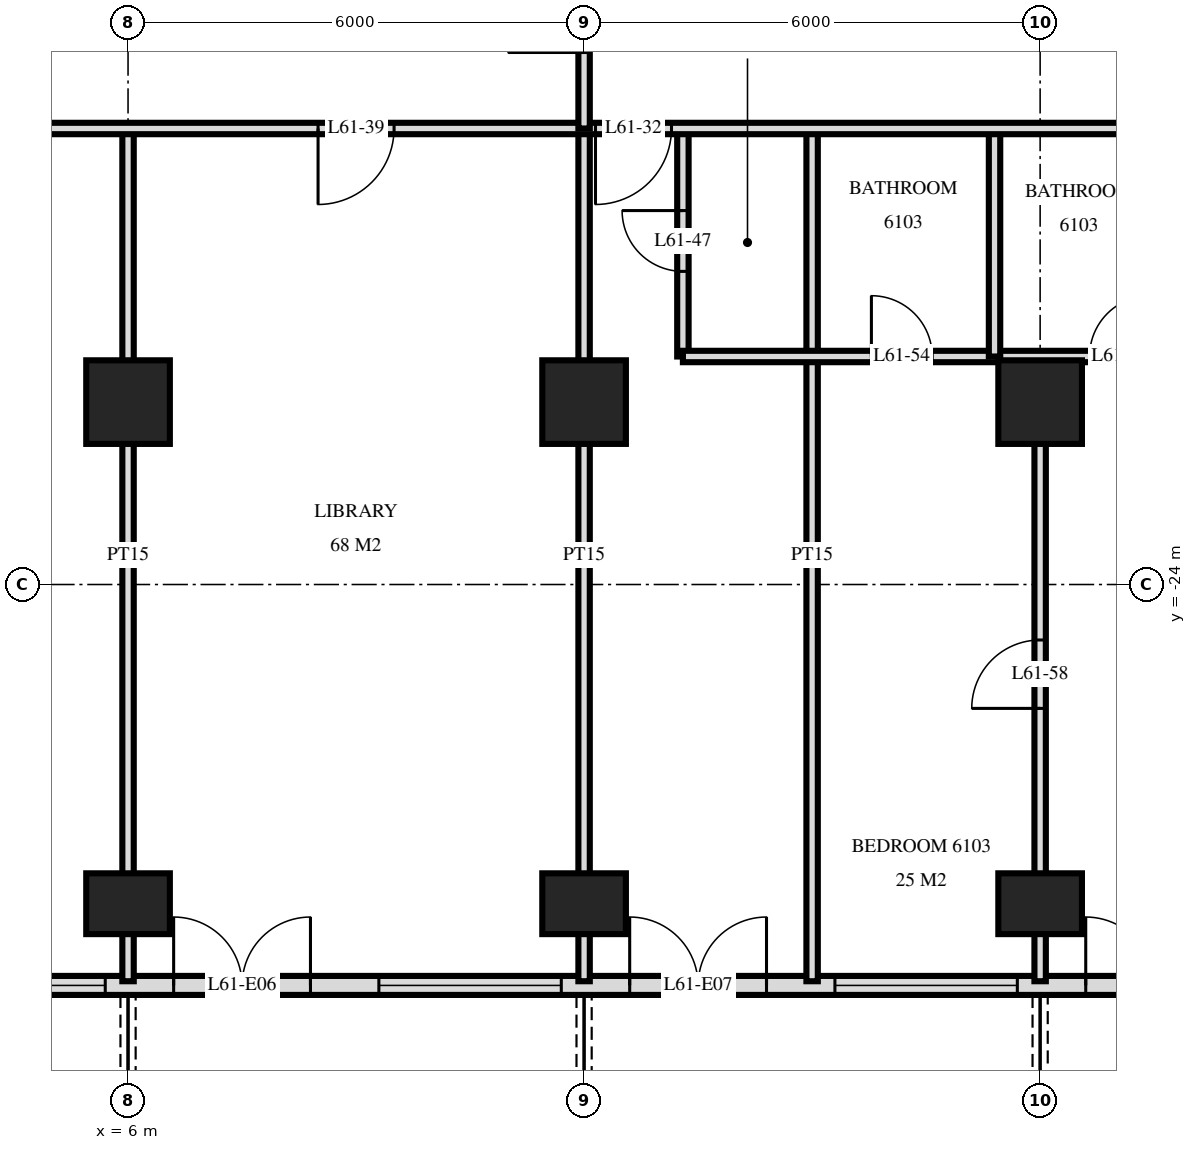
"""IFC4 building model, lengths in metres.
Left out: names, types, materials, properties, quantities, classifications, styles, units other than length and angle.
Written with IfcOpenShell. Run it as: python <this file> out.ifc"""

import sys

from ifc_helpers import new_model, si_unit, direction, frame, frame_2d, origin, origin_2d, place, context, subcontext, project, spatial, rectangle, extrude, element, fill, save


model = new_model("IFC4")
c1 = context("Model", 3, precision=1e-05, world=origin(), true_north=direction((0.0, 1.0)))
c2 = subcontext(c1, "Body", "Model", "MODEL_VIEW")
j1 = project(units=[si_unit("LENGTHUNIT", "METRE"), si_unit("PLANEANGLEUNIT", "RADIAN")], contexts=[c1])
p1 = place(None, origin())
s1 = spatial("IfcSite", under=j1, at=p1, CompositionType="ELEMENT")
p2 = place(p1, origin())
s2 = spatial("IfcBuilding", under=s1, at=p2, CompositionType="ELEMENT")
p3 = place(p2, frame((0.0, 0.0, 232.6)))
s3 = spatial("IfcBuildingStorey", under=s2, at=p3, CompositionType="ELEMENT", Elevation=232.6)
p4 = place(p3, frame((6.0, -28.2, 0.0), z_axis=(0.0, 0.0, 1.0), x_axis=(1.0, 0.0, 0.0)))
e1 = element("IfcColumn", 1, at=p4, inside=s3, PredefinedType="COLUMN", context=c2, shape_type="SweptSolid", body=[
    extrude(rectangle(XDim=1.1, YDim=0.8, at=origin_2d()), origin(), (0.0, 0.0, 1.0), 3.5),
])
p5 = place(p3, frame((6.0, -21.6, 0.0), z_axis=(0.0, 0.0, 1.0), x_axis=(1.0, 0.0, 0.0)))
e2 = element("IfcColumn", 2, at=p5, inside=s3, PredefinedType="COLUMN", context=c2, shape_type="SweptSolid", body=[
    extrude(rectangle(XDim=1.1, YDim=1.1, at=origin_2d()), origin(), (0.0, 0.0, 1.0), 3.5),
])
p6 = place(p3, frame((12.0, -28.2, 0.0), z_axis=(0.0, 0.0, 1.0), x_axis=(1.0, 0.0, 0.0)))
e3 = element("IfcColumn", 3, at=p6, inside=s3, PredefinedType="COLUMN", context=c2, shape_type="SweptSolid", body=[
    extrude(rectangle(XDim=1.1, YDim=0.8, at=origin_2d()), origin(), (0.0, 0.0, 1.0), 3.5),
])
p7 = place(p3, frame((12.0, -21.6, 0.0), z_axis=(0.0, 0.0, 1.0), x_axis=(1.0, 0.0, 0.0)))
e4 = element("IfcColumn", 4, at=p7, inside=s3, PredefinedType="COLUMN", context=c2, shape_type="SweptSolid", body=[
    extrude(rectangle(XDim=1.1, YDim=1.1, at=origin_2d()), origin(), (0.0, 0.0, 1.0), 3.5),
])
p8 = place(p3, frame((18.0, -28.2, 0.0), z_axis=(0.0, 0.0, 1.0), x_axis=(1.0, 0.0, 0.0)))
e5 = element("IfcColumn", 5, at=p8, inside=s3, PredefinedType="COLUMN", context=c2, shape_type="SweptSolid", body=[
    extrude(rectangle(XDim=1.1, YDim=0.8, at=origin_2d()), origin(), (0.0, 0.0, 1.0), 3.5),
])
p9 = place(p3, frame((18.0, -21.6, 0.0), z_axis=(0.0, 0.0, 1.0), x_axis=(1.0, 0.0, 0.0)))
e6 = element("IfcColumn", 6, at=p9, inside=s3, PredefinedType="COLUMN", context=c2, shape_type="SweptSolid", body=[
    extrude(rectangle(XDim=1.1, YDim=1.1, at=origin_2d()), origin(), (0.0, 0.0, 1.0), 3.5),
])
p10 = place(p3, frame((-22.475, -29.275, 0.0), z_axis=(0.0, 0.0, 1.0), x_axis=(1.0, 0.0, 0.0)))
e7 = element("IfcWall", 7, at=p10, inside=s3, PredefinedType="SOLIDWALL", context=c2, shape_type="SweptSolid", body=[
    extrude(rectangle(XDim=44.951, YDim=0.25, at=frame_2d((22.475, 0.0))), origin(), (0.0, 0.0, 1.0), 3.22),
])
p11 = place(p10, frame((0.575, 0.0, 0.0)))
e8 = element("IfcOpeningElement", 8, at=p11, cuts=e7, PredefinedType="OPENING", context=c2, shape_type="SweptSolid", body=[
    extrude(rectangle(XDim=1.8, YDim=2.4, at=frame_2d((0.9, 1.2))), frame((0.0, 0.135, 0.0), z_axis=(0.0, -1.0, 0.0), x_axis=(1.0, 0.0, 0.0)), (0.0, 0.0, 1.0), 0.27),
])
p12 = place(p10, frame((8.075, 0.0, 0.0)))
e9 = element("IfcOpeningElement", 9, at=p12, cuts=e7, PredefinedType="OPENING", context=c2, shape_type="SweptSolid", body=[
    extrude(rectangle(XDim=1.8, YDim=2.4, at=frame_2d((0.9, 1.2))), frame((0.0, 0.135, 0.0), z_axis=(0.0, -1.0, 0.0), x_axis=(1.0, 0.0, 0.0)), (0.0, 0.0, 1.0), 0.27),
])
p13 = place(p10, frame((11.075, 0.0, 0.0)))
e10 = element("IfcOpeningElement", 10, at=p13, cuts=e7, PredefinedType="OPENING", context=c2, shape_type="SweptSolid", body=[
    extrude(rectangle(XDim=1.8, YDim=2.4, at=frame_2d((0.9, 1.2))), frame((0.0, 0.135, 0.0), z_axis=(0.0, -1.0, 0.0), x_axis=(1.0, 0.0, 0.0)), (0.0, 0.0, 1.0), 0.27),
])
p14 = place(p10, frame((13.775, 0.0, 0.9)))
e11 = element("IfcOpeningElement", 11, at=p14, cuts=e7, PredefinedType="OPENING", context=c2, shape_type="SweptSolid", body=[
    extrude(rectangle(XDim=2.4, YDim=1.5, at=frame_2d((1.2, 0.75))), frame((0.0, 0.135, 0.0), z_axis=(0.0, -1.0, 0.0), x_axis=(1.0, 0.0, 0.0)), (0.0, 0.0, 1.0), 0.27),
])
p15 = place(p10, frame((16.775, 0.0, 0.9)))
e12 = element("IfcOpeningElement", 12, at=p15, cuts=e7, PredefinedType="OPENING", context=c2, shape_type="SweptSolid", body=[
    extrude(rectangle(XDim=2.4, YDim=1.5, at=frame_2d((1.2, 0.75))), frame((0.0, 0.135, 0.0), z_axis=(0.0, -1.0, 0.0), x_axis=(1.0, 0.0, 0.0)), (0.0, 0.0, 1.0), 0.27),
])
p16 = place(p10, frame((20.075, 0.0, 0.0)))
e13 = element("IfcOpeningElement", 13, at=p16, cuts=e7, PredefinedType="OPENING", context=c2, shape_type="SweptSolid", body=[
    extrude(rectangle(XDim=1.8, YDim=2.4, at=frame_2d((0.9, 1.2))), frame((0.0, 0.135, 0.0), z_axis=(0.0, -1.0, 0.0), x_axis=(1.0, 0.0, 0.0)), (0.0, 0.0, 1.0), 0.27),
])
p17 = place(p10, frame((23.075, 0.0, 0.0)))
e14 = element("IfcOpeningElement", 14, at=p17, cuts=e7, PredefinedType="OPENING", context=c2, shape_type="SweptSolid", body=[
    extrude(rectangle(XDim=1.8, YDim=2.4, at=frame_2d((0.9, 1.2))), frame((0.0, 0.135, 0.0), z_axis=(0.0, -1.0, 0.0), x_axis=(1.0, 0.0, 0.0)), (0.0, 0.0, 1.0), 0.27),
])
p18 = place(p10, frame((25.775, 0.0, 0.9)))
e15 = element("IfcOpeningElement", 15, at=p18, cuts=e7, PredefinedType="OPENING", context=c2, shape_type="SweptSolid", body=[
    extrude(rectangle(XDim=2.4, YDim=1.5, at=frame_2d((1.2, 0.75))), frame((0.0, 0.135, 0.0), z_axis=(0.0, -1.0, 0.0), x_axis=(1.0, 0.0, 0.0)), (0.0, 0.0, 1.0), 0.27),
])
p19 = place(p10, frame((29.075, 0.0, 0.0)))
e16 = element("IfcOpeningElement", 16, at=p19, cuts=e7, PredefinedType="OPENING", context=c2, shape_type="SweptSolid", body=[
    extrude(rectangle(XDim=1.8, YDim=2.4, at=frame_2d((0.9, 1.2))), frame((0.0, 0.135, 0.0), z_axis=(0.0, -1.0, 0.0), x_axis=(1.0, 0.0, 0.0)), (0.0, 0.0, 1.0), 0.27),
])
p20 = place(p10, frame((31.775, 0.0, 0.9)))
e17 = element("IfcOpeningElement", 17, at=p20, cuts=e7, PredefinedType="OPENING", context=c2, shape_type="SweptSolid", body=[
    extrude(rectangle(XDim=2.4, YDim=1.5, at=frame_2d((1.2, 0.75))), frame((0.0, 0.135, 0.0), z_axis=(0.0, -1.0, 0.0), x_axis=(1.0, 0.0, 0.0)), (0.0, 0.0, 1.0), 0.27),
])
p21 = place(p10, frame((35.075, 0.0, 0.0)))
e18 = element("IfcOpeningElement", 18, at=p21, cuts=e7, PredefinedType="OPENING", context=c2, shape_type="SweptSolid", body=[
    extrude(rectangle(XDim=1.8, YDim=2.4, at=frame_2d((0.9, 1.2))), frame((0.0, 0.135, 0.0), z_axis=(0.0, -1.0, 0.0), x_axis=(1.0, 0.0, 0.0)), (0.0, 0.0, 1.0), 0.27),
])
p22 = place(p10, frame((37.775, 0.0, 0.9)))
e19 = element("IfcOpeningElement", 19, at=p22, cuts=e7, PredefinedType="OPENING", context=c2, shape_type="SweptSolid", body=[
    extrude(rectangle(XDim=2.4, YDim=1.5, at=frame_2d((1.2, 0.75))), frame((0.0, 0.135, 0.0), z_axis=(0.0, -1.0, 0.0), x_axis=(1.0, 0.0, 0.0)), (0.0, 0.0, 1.0), 0.27),
])
p23 = place(p10, frame((41.075, 0.0, 0.0)))
e20 = element("IfcOpeningElement", 20, at=p23, cuts=e7, PredefinedType="OPENING", context=c2, shape_type="SweptSolid", body=[
    extrude(rectangle(XDim=1.8, YDim=2.4, at=frame_2d((0.9, 1.2))), frame((0.0, 0.135, 0.0), z_axis=(0.0, -1.0, 0.0), x_axis=(1.0, 0.0, 0.0)), (0.0, 0.0, 1.0), 0.27),
])
p24 = place(p3, frame((18.0, -29.22, 0.0), z_axis=(0.0, 0.0, 1.0), x_axis=(0.0, 1.0, 0.0)))
e21 = element("IfcWall", 21, at=p24, inside=s3, PredefinedType="PARTITIONING", context=c2, shape_type="SweptSolid", body=[
    extrude(rectangle(XDim=8.22, YDim=0.15, at=frame_2d((4.11, 0.0))), origin(), (0.0, 0.0, 1.0), 3.22),
])
p25 = place(p24, frame((3.59, 0.0, 0.0)))
e22 = element("IfcOpeningElement", 22, at=p25, cuts=e21, PredefinedType="OPENING", context=c2, shape_type="SweptSolid", body=[
    extrude(rectangle(XDim=0.9, YDim=2.1, at=frame_2d((0.45, 1.05))), frame((0.0, 0.085, 0.0), z_axis=(0.0, -1.0, 0.0), x_axis=(1.0, 0.0, 0.0)), (0.0, 0.0, 1.0), 0.17),
])
p26 = place(p3, frame((17.4, -21.0, 0.0), z_axis=(0.0, 0.0, 1.0), x_axis=(0.0, 1.0, 0.0)))
e23 = element("IfcWall", 23, at=p26, inside=s3, PredefinedType="PARTITIONING", context=c2, shape_type="SweptSolid", body=[
    extrude(rectangle(XDim=3.0, YDim=0.15, at=frame_2d((1.5, 0.0))), origin(), (0.0, 0.0, 1.0), 3.22),
])
p27 = place(p3, frame((15.0, -29.22, 0.0), z_axis=(0.0, 0.0, 1.0), x_axis=(0.0, 1.0, 0.0)))
e24 = element("IfcWall", 24, at=p27, inside=s3, PredefinedType="PARTITIONING", context=c2, shape_type="SweptSolid", body=[
    extrude(rectangle(XDim=11.22, YDim=0.15, at=frame_2d((5.61, 0.0))), origin(), (0.0, 0.0, 1.0), 3.22),
])
p28 = place(p3, frame((13.3, -21.0, 0.0), z_axis=(0.0, 0.0, 1.0), x_axis=(0.0, 1.0, 0.0)))
e25 = element("IfcWall", 25, at=p28, inside=s3, PredefinedType="PARTITIONING", context=c2, shape_type="SweptSolid", body=[
    extrude(rectangle(XDim=3.0, YDim=0.15, at=frame_2d((1.5, 0.0))), origin(), (0.0, 0.0, 1.0), 3.22),
])
p29 = place(p28, frame((1.12, 0.0, 0.0)))
e26 = element("IfcOpeningElement", 26, at=p29, cuts=e25, PredefinedType="OPENING", context=c2, shape_type="SweptSolid", body=[
    extrude(rectangle(XDim=0.8, YDim=2.1, at=frame_2d((0.4, 1.05))), frame((0.0, 0.085, 0.0), z_axis=(0.0, -1.0, 0.0), x_axis=(1.0, 0.0, 0.0)), (0.0, 0.0, 1.0), 0.17),
])
p30 = place(p3, frame((12.0, -18.0, 0.0), z_axis=(0.0, 0.0, 1.0), x_axis=(0.0, 1.0, 0.0)))
e27 = element("IfcWall", 27, at=p30, inside=s3, PredefinedType="PARTITIONING", context=c2, shape_type="SweptSolid", body=[
    extrude(rectangle(XDim=2.95, YDim=0.15, at=frame_2d((1.475, 0.0))), origin(), (0.0, 0.0, 1.0), 3.22),
])
p31 = place(p30, frame((1.0, 0.0, 0.0)))
e28 = element("IfcOpeningElement", 28, at=p31, cuts=e27, PredefinedType="OPENING", context=c2, shape_type="SweptSolid", body=[
    extrude(rectangle(XDim=1.0, YDim=2.1, at=frame_2d((0.5, 1.05))), frame((0.0, 0.085, 0.0), z_axis=(0.0, -1.0, 0.0), x_axis=(1.0, 0.0, 0.0)), (0.0, 0.0, 1.0), 0.17),
])
for number, where, z_axis, x_axis in (
    (29, (12.0, -29.22, 0.0), (0.0, 0.0, 1.0), (0.0, 1.0, 0.0)),
    (30, (6.0, -29.22, 0.0), (0.0, 0.0, 1.0), (0.0, 1.0, 0.0)),
):
    element("IfcWall", number, at=place(p3, frame(where, z_axis=z_axis, x_axis=x_axis)), inside=s3, PredefinedType="PARTITIONING", context=c2, shape_type="SweptSolid", body=[
        extrude(rectangle(XDim=11.22, YDim=0.15, at=frame_2d((5.61, 0.0))), origin(), (0.0, 0.0, 1.0), 3.22),
    ])
p32 = place(p3, frame((13.3, -21.0, 0.0), z_axis=(0.0, 0.0, 1.0), x_axis=(1.0, 0.0, 0.0)))
e31 = element("IfcWall", 31, at=p32, inside=s3, PredefinedType="PARTITIONING", context=c2, shape_type="SweptSolid", body=[
    extrude(rectangle(XDim=8.1, YDim=0.15, at=frame_2d((4.05, 0.0))), origin(), (0.0, 0.0, 1.0), 3.22),
])
p33 = place(p32, frame((2.48, 0.0, 0.0)))
e32 = element("IfcOpeningElement", 32, at=p33, cuts=e31, PredefinedType="OPENING", context=c2, shape_type="SweptSolid", body=[
    extrude(rectangle(XDim=0.8, YDim=2.1, at=frame_2d((0.4, 1.05))), frame((0.0, 0.085, 0.0), z_axis=(0.0, -1.0, 0.0), x_axis=(1.0, 0.0, 0.0)), (0.0, 0.0, 1.0), 0.17),
])
p34 = place(p32, frame((5.35, 0.0, 0.0)))
e33 = element("IfcOpeningElement", 33, at=p34, cuts=e31, PredefinedType="OPENING", context=c2, shape_type="SweptSolid", body=[
    extrude(rectangle(XDim=0.8, YDim=2.1, at=frame_2d((0.4, 1.05))), frame((0.0, 0.085, 0.0), z_axis=(0.0, -1.0, 0.0), x_axis=(1.0, 0.0, 0.0)), (0.0, 0.0, 1.0), 0.17),
])
p35 = place(p3, frame((-26.82, -18.0, 0.0), z_axis=(0.0, 0.0, 1.0), x_axis=(1.0, 0.0, 0.0)))
e34 = element("IfcWall", 34, at=p35, inside=s3, PredefinedType="PARTITIONING", context=c2, shape_type="SweptSolid", body=[
    extrude(rectangle(XDim=53.64, YDim=0.15, at=frame_2d((26.82, 0.0))), origin(), (0.0, 0.0, 1.0), 3.22),
])
p36 = place(p35, frame((4.92, 0.0, 0.0)))
e35 = element("IfcOpeningElement", 35, at=p36, cuts=e34, PredefinedType="OPENING", context=c2, shape_type="SweptSolid", body=[
    extrude(rectangle(XDim=1.0, YDim=2.1, at=frame_2d((0.5, 1.05))), frame((0.0, 0.085, 0.0), z_axis=(0.0, -1.0, 0.0), x_axis=(1.0, 0.0, 0.0)), (0.0, 0.0, 1.0), 0.17),
])
p37 = place(p35, frame((1.62, 0.0, 0.0)))
e36 = element("IfcOpeningElement", 36, at=p37, cuts=e34, PredefinedType="OPENING", context=c2, shape_type="SweptSolid", body=[
    extrude(rectangle(XDim=1.0, YDim=2.1, at=frame_2d((0.5, 1.05))), frame((0.0, 0.085, 0.0), z_axis=(0.0, -1.0, 0.0), x_axis=(1.0, 0.0, 0.0)), (0.0, 0.0, 1.0), 0.17),
])
p38 = place(p35, frame((38.97, 0.0, 0.0)))
e37 = element("IfcOpeningElement", 37, at=p38, cuts=e34, PredefinedType="OPENING", context=c2, shape_type="SweptSolid", body=[
    extrude(rectangle(XDim=1.0, YDim=2.1, at=frame_2d((0.5, 1.05))), frame((0.0, 0.085, 0.0), z_axis=(0.0, -1.0, 0.0), x_axis=(1.0, 0.0, 0.0)), (0.0, 0.0, 1.0), 0.17),
])
p39 = place(p35, frame((48.72, 0.0, 0.0)))
e38 = element("IfcOpeningElement", 38, at=p39, cuts=e34, PredefinedType="OPENING", context=c2, shape_type="SweptSolid", body=[
    extrude(rectangle(XDim=1.0, YDim=2.1, at=frame_2d((0.5, 1.05))), frame((0.0, 0.085, 0.0), z_axis=(0.0, -1.0, 0.0), x_axis=(1.0, 0.0, 0.0)), (0.0, 0.0, 1.0), 0.17),
])
p40 = place(p35, frame((46.92, 0.0, 0.0)))
e39 = element("IfcOpeningElement", 39, at=p40, cuts=e34, PredefinedType="OPENING", context=c2, shape_type="SweptSolid", body=[
    extrude(rectangle(XDim=1.0, YDim=2.1, at=frame_2d((0.5, 1.05))), frame((0.0, 0.085, 0.0), z_axis=(0.0, -1.0, 0.0), x_axis=(1.0, 0.0, 0.0)), (0.0, 0.0, 1.0), 0.17),
])
p41 = place(p35, frame((18.82, 0.0, 0.0)))
e40 = element("IfcOpeningElement", 40, at=p41, cuts=e34, PredefinedType="OPENING", context=c2, shape_type="SweptSolid", body=[
    extrude(rectangle(XDim=1.0, YDim=2.1, at=frame_2d((0.5, 1.05))), frame((0.0, 0.085, 0.0), z_axis=(0.0, -1.0, 0.0), x_axis=(1.0, 0.0, 0.0)), (0.0, 0.0, 1.0), 0.17),
])
p42 = place(p35, frame((27.82, 0.0, 0.0)))
e41 = element("IfcOpeningElement", 41, at=p42, cuts=e34, PredefinedType="OPENING", context=c2, shape_type="SweptSolid", body=[
    extrude(rectangle(XDim=1.0, YDim=2.1, at=frame_2d((0.5, 1.05))), frame((0.0, 0.085, 0.0), z_axis=(0.0, -1.0, 0.0), x_axis=(1.0, 0.0, 0.0)), (0.0, 0.0, 1.0), 0.17),
])
p43 = place(p35, frame((35.32, 0.0, 0.0)))
e42 = element("IfcOpeningElement", 42, at=p43, cuts=e34, PredefinedType="OPENING", context=c2, shape_type="SweptSolid", body=[
    extrude(rectangle(XDim=1.0, YDim=2.1, at=frame_2d((0.5, 1.05))), frame((0.0, 0.085, 0.0), z_axis=(0.0, -1.0, 0.0), x_axis=(1.0, 0.0, 0.0)), (0.0, 0.0, 1.0), 0.17),
])
p44 = place(p18, origin())
e43 = element("IfcWindow", 43, at=p44, inside=s3, PartitioningType="SINGLE_PANEL", PredefinedType="WINDOW", context=c2, shape_type="SweptSolid", body=[
    extrude(rectangle(XDim=2.4, YDim=1.5, at=frame_2d((1.2, 0.75))), frame((0.0, 0.03, 0.0), z_axis=(0.0, -1.0, 0.0), x_axis=(1.0, 0.0, 0.0)), (0.0, 0.0, 1.0), 0.06),
])
fill(e15, e43)
p45 = place(p19, origin())
e44 = element("IfcDoor", 44, at=p45, inside=s3, OperationType="DOUBLE_DOOR_SINGLE_SWING", PredefinedType="DOOR", context=c2, shape_type="SweptSolid", body=[
    extrude(rectangle(XDim=1.8, YDim=2.4, at=frame_2d((0.9, 1.2))), frame((0.0, 0.025, 0.0), z_axis=(0.0, -1.0, 0.0), x_axis=(1.0, 0.0, 0.0)), (0.0, 0.0, 1.0), 0.05),
])
fill(e16, e44)
p46 = place(p20, origin())
e45 = element("IfcWindow", 45, at=p46, inside=s3, PartitioningType="SINGLE_PANEL", PredefinedType="WINDOW", context=c2, shape_type="SweptSolid", body=[
    extrude(rectangle(XDim=2.4, YDim=1.5, at=frame_2d((1.2, 0.75))), frame((0.0, 0.03, 0.0), z_axis=(0.0, -1.0, 0.0), x_axis=(1.0, 0.0, 0.0)), (0.0, 0.0, 1.0), 0.06),
])
fill(e17, e45)
p47 = place(p21, origin())
e46 = element("IfcDoor", 46, at=p47, inside=s3, OperationType="DOUBLE_DOOR_SINGLE_SWING", PredefinedType="DOOR", context=c2, shape_type="SweptSolid", body=[
    extrude(rectangle(XDim=1.8, YDim=2.4, at=frame_2d((0.9, 1.2))), frame((0.0, 0.025, 0.0), z_axis=(0.0, -1.0, 0.0), x_axis=(1.0, 0.0, 0.0)), (0.0, 0.0, 1.0), 0.05),
])
fill(e18, e46)
p48 = place(p22, origin())
e47 = element("IfcWindow", 47, at=p48, inside=s3, PartitioningType="SINGLE_PANEL", PredefinedType="WINDOW", context=c2, shape_type="SweptSolid", body=[
    extrude(rectangle(XDim=2.4, YDim=1.5, at=frame_2d((1.2, 0.75))), frame((0.0, 0.03, 0.0), z_axis=(0.0, -1.0, 0.0), x_axis=(1.0, 0.0, 0.0)), (0.0, 0.0, 1.0), 0.06),
])
fill(e19, e47)
p49 = place(p23, origin())
e48 = element("IfcDoor", 48, at=p49, inside=s3, OperationType="DOUBLE_DOOR_SINGLE_SWING", PredefinedType="DOOR", context=c2, shape_type="SweptSolid", body=[
    extrude(rectangle(XDim=1.8, YDim=2.4, at=frame_2d((0.9, 1.2))), frame((0.0, 0.025, 0.0), z_axis=(0.0, -1.0, 0.0), x_axis=(1.0, 0.0, 0.0)), (0.0, 0.0, 1.0), 0.05),
])
fill(e20, e48)
p50 = place(p38, frame((0.5, 0.0, 0.0), z_axis=(0.0, 0.0, 1.0), x_axis=(-1.0, 0.0, 0.0)))
e49 = element("IfcDoor", 49, at=p50, inside=s3, OperationType="SINGLE_SWING_LEFT", PredefinedType="DOOR", context=c2, shape_type="SweptSolid", body=[
    extrude(rectangle(XDim=1.0, YDim=2.1, at=frame_2d((0.0, 1.05))), frame((0.0, -0.025, 0.0), z_axis=(0.0, 1.0, 0.0), x_axis=(-1.0, 0.0, 0.0)), (0.0, 0.0, 1.0), 0.05),
])
fill(e37, e49)
p51 = place(p43, frame((0.5, 0.0, 0.0), z_axis=(0.0, 0.0, 1.0), x_axis=(-1.0, 0.0, 0.0)))
e50 = element("IfcDoor", 50, at=p51, inside=s3, OperationType="SINGLE_SWING_LEFT", PredefinedType="DOOR", context=c2, shape_type="SweptSolid", body=[
    extrude(rectangle(XDim=1.0, YDim=2.1, at=frame_2d((0.0, 1.05))), frame((0.0, -0.025, 0.0), z_axis=(0.0, 1.0, 0.0), x_axis=(-1.0, 0.0, 0.0)), (0.0, 0.0, 1.0), 0.05),
])
fill(e42, e50)
p52 = place(p29, origin())
e51 = element("IfcDoor", 51, at=p52, inside=s3, OperationType="SINGLE_SWING_LEFT", PredefinedType="DOOR", context=c2, shape_type="SweptSolid", body=[
    extrude(rectangle(XDim=0.8, YDim=2.1, at=frame_2d((0.4, 1.05))), frame((0.0, 0.025, 0.0), z_axis=(0.0, -1.0, 0.0), x_axis=(1.0, 0.0, 0.0)), (0.0, 0.0, 1.0), 0.05),
])
fill(e26, e51)
p53 = place(p33, origin())
e52 = element("IfcDoor", 52, at=p53, inside=s3, OperationType="SINGLE_SWING_RIGHT", PredefinedType="DOOR", context=c2, shape_type="SweptSolid", body=[
    extrude(rectangle(XDim=0.8, YDim=2.1, at=frame_2d((0.4, 1.05))), frame((0.0, 0.025, 0.0), z_axis=(0.0, -1.0, 0.0), x_axis=(1.0, 0.0, 0.0)), (0.0, 0.0, 1.0), 0.05),
])
fill(e32, e52)
p54 = place(p34, origin())
e53 = element("IfcDoor", 53, at=p54, inside=s3, OperationType="SINGLE_SWING_LEFT", PredefinedType="DOOR", context=c2, shape_type="SweptSolid", body=[
    extrude(rectangle(XDim=0.8, YDim=2.1, at=frame_2d((0.4, 1.05))), frame((0.0, 0.025, 0.0), z_axis=(0.0, -1.0, 0.0), x_axis=(1.0, 0.0, 0.0)), (0.0, 0.0, 1.0), 0.05),
])
fill(e33, e53)
p55 = place(p25, origin())
e54 = element("IfcDoor", 54, at=p55, inside=s3, OperationType="SINGLE_SWING_RIGHT", PredefinedType="DOOR", context=c2, shape_type="SweptSolid", body=[
    extrude(rectangle(XDim=0.9, YDim=2.1, at=frame_2d((0.45, 1.05))), frame((0.0, 0.025, 0.0), z_axis=(0.0, -1.0, 0.0), x_axis=(1.0, 0.0, 0.0)), (0.0, 0.0, 1.0), 0.05),
])
fill(e22, e54)
save(model, sys.argv[1])
